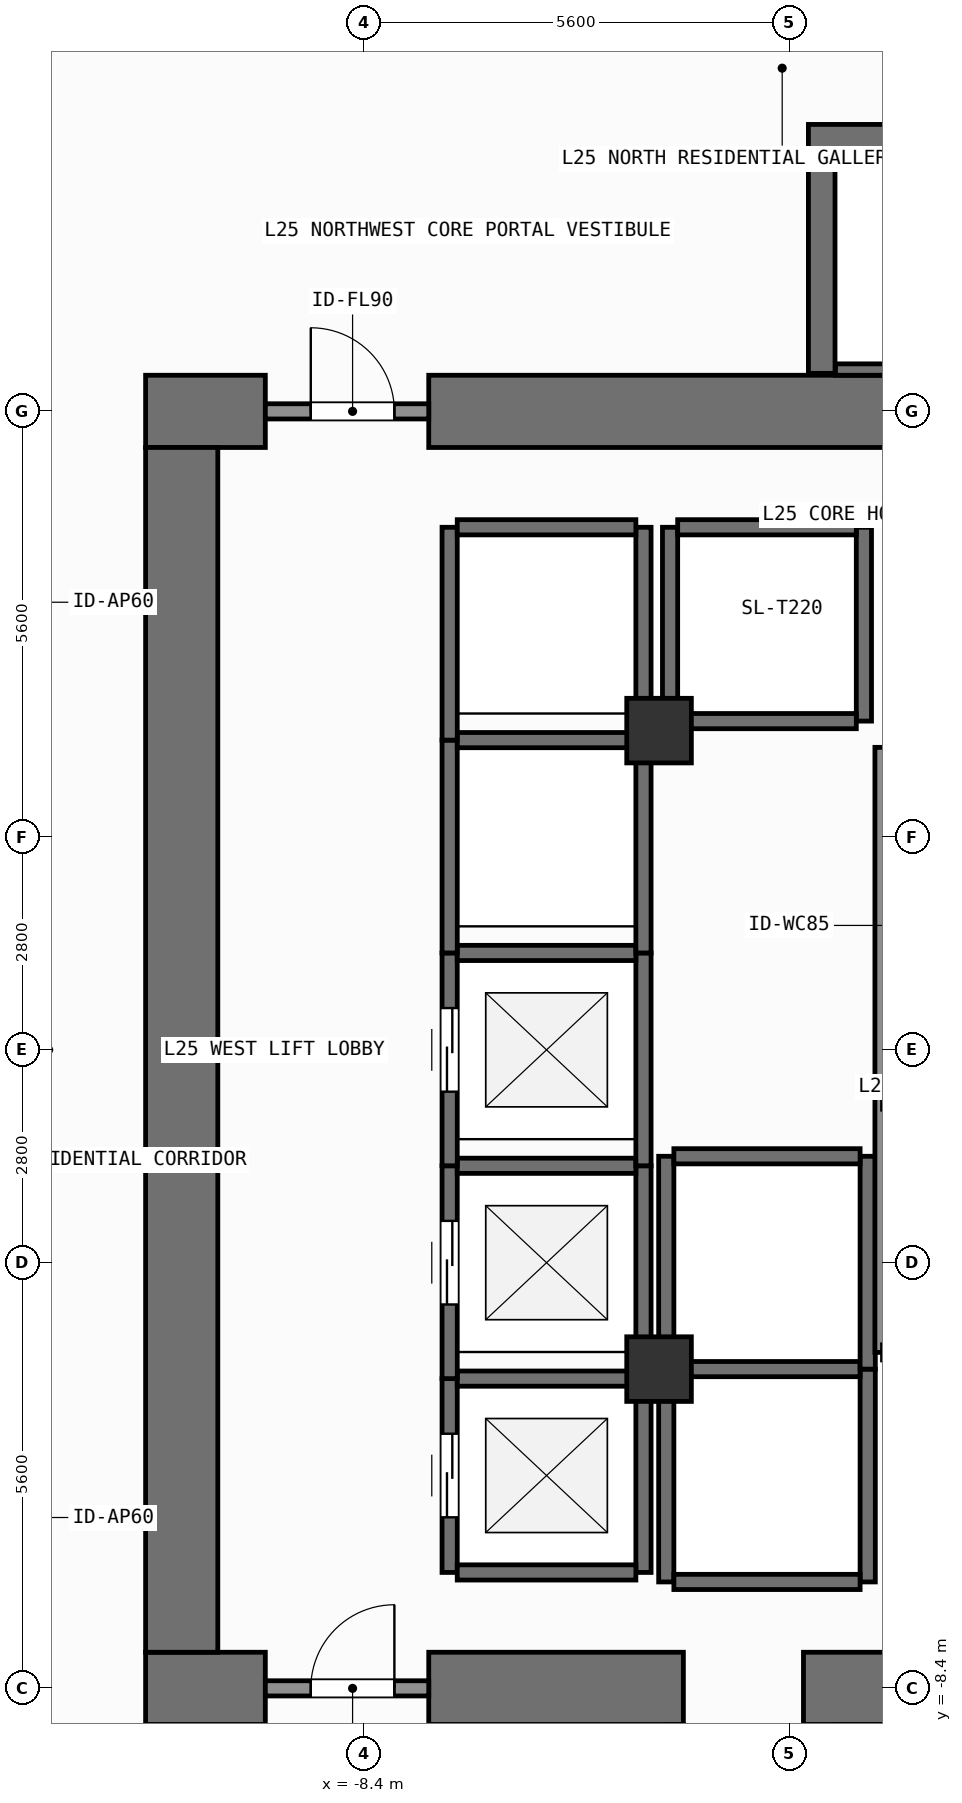
"""IFC4 building model, lengths in metres.
Left out: names, types, materials, properties, quantities, classifications, styles, units other than length and angle.
Written with IfcOpenShell. Run it as: python <this file> out.ifc"""

import sys

from ifc_helpers import new_model, si_unit, direction, frame, frame_2d, origin, origin_2d, place, context, subcontext, project, spatial, rectangle, extrude, element, fill, save


model = new_model("IFC4")
c1 = context("Model", 3, precision=1e-05, world=origin(), true_north=direction((0.0, 1.0)))
c2 = subcontext(c1, "Body", "Model", "MODEL_VIEW")
j1 = project(units=[si_unit("LENGTHUNIT", "METRE"), si_unit("PLANEANGLEUNIT", "RADIAN")], contexts=[c1])
p1 = place(None, origin())
s1 = spatial("IfcSite", under=j1, at=p1, CompositionType="ELEMENT")
p2 = place(p1, origin())
s2 = spatial("IfcBuilding", under=s1, at=p2, CompositionType="ELEMENT")
p3 = place(p2, frame((0.0, 0.0, 100.8)))
s3 = spatial("IfcBuildingStorey", under=s2, at=p3, CompositionType="ELEMENT", Elevation=100.8)
p4 = place(p3, frame((-11.275, -8.4, 0.0), z_axis=(0.0, 0.0, 1.0), x_axis=(1.0, 0.0, 0.0)))
e1 = element("IfcWall", 1, at=p4, inside=s3, PredefinedType="SHEAR", context=c2, shape_type="SweptSolid", body=[
    extrude(rectangle(XDim=1.575, YDim=0.95, at=frame_2d((0.788, 0.0))), origin(), (0.0, 0.0, 1.0), 3.9),
])
p5 = place(p3, frame((-7.55, -8.4, 0.0), z_axis=(0.0, 0.0, 1.0), x_axis=(1.0, 0.0, 0.0)))
e2 = element("IfcWall", 2, at=p5, inside=s3, PredefinedType="SHEAR", context=c2, shape_type="SweptSolid", body=[
    extrude(rectangle(XDim=3.35, YDim=0.95, at=frame_2d((1.675, 0.0))), origin(), (0.0, 0.0, 1.0), 3.9),
])
p6 = place(p3, frame((-2.62, -8.4, 0.0), z_axis=(0.0, 0.0, 1.0), x_axis=(1.0, 0.0, 0.0)))
e3 = element("IfcWall", 3, at=p6, inside=s3, PredefinedType="SHEAR", context=c2, shape_type="SweptSolid", body=[
    extrude(rectangle(XDim=7.27, YDim=0.95, at=frame_2d((3.635, 0.0))), origin(), (0.0, 0.0, 1.0), 3.9),
])
p7 = place(p3, frame((-11.275, 8.4, 0.0), z_axis=(0.0, 0.0, 1.0), x_axis=(1.0, 0.0, 0.0)))
e4 = element("IfcWall", 4, at=p7, inside=s3, PredefinedType="SHEAR", context=c2, shape_type="SweptSolid", body=[
    extrude(rectangle(XDim=1.575, YDim=0.95, at=frame_2d((0.788, 0.0))), origin(), (0.0, 0.0, 1.0), 3.9),
])
p8 = place(p3, frame((-7.55, 8.4, 0.0), z_axis=(0.0, 0.0, 1.0), x_axis=(1.0, 0.0, 0.0)))
e5 = element("IfcWall", 5, at=p8, inside=s3, PredefinedType="SHEAR", context=c2, shape_type="SweptSolid", body=[
    extrude(rectangle(XDim=16.425, YDim=0.95, at=frame_2d((8.212, 0.0))), origin(), (0.0, 0.0, 1.0), 3.9),
])
p9 = place(p3, frame((-10.8, -7.925, 0.0), z_axis=(0.0, 0.0, 1.0), x_axis=(0.0, 1.0, 0.0)))
e6 = element("IfcWall", 6, at=p9, inside=s3, PredefinedType="SHEAR", context=c2, shape_type="SweptSolid", body=[
    extrude(rectangle(XDim=15.85, YDim=0.95, at=frame_2d((7.925, 0.0))), origin(), (0.0, 0.0, 1.0), 3.9),
])
p10 = place(p3, frame((-2.555, 12.0, 0.0), z_axis=(0.0, 0.0, 1.0), x_axis=(1.0, 0.0, 0.0)))
e7 = element("IfcWall", 7, at=p10, inside=s3, PredefinedType="SHEAR", context=c2, shape_type="SweptSolid", body=[
    extrude(rectangle(XDim=7.31, YDim=0.35, at=frame_2d((3.655, 0.0))), origin(), (0.0, 0.0, 1.0), 3.9),
])
p11 = place(p3, frame((-2.2, 8.95, 0.0), z_axis=(0.0, 0.0, 1.0), x_axis=(1.0, 0.0, 0.0)))
e8 = element("IfcWall", 8, at=p11, inside=s3, PredefinedType="SHEAR", context=c2, shape_type="SweptSolid", body=[
    extrude(rectangle(XDim=6.6, YDim=0.15, at=frame_2d((3.3, 0.0))), origin(), (0.0, 0.0, 1.0), 3.9),
])
p12 = place(p3, frame((-2.38, 8.9, 0.0), z_axis=(0.0, 0.0, 1.0), x_axis=(0.0, 1.0, 0.0)))
e9 = element("IfcWall", 9, at=p12, inside=s3, PredefinedType="SHEAR", context=c2, shape_type="SweptSolid", body=[
    extrude(rectangle(XDim=2.925, YDim=0.35, at=frame_2d((1.462, 0.0))), origin(), (0.0, 0.0, 1.0), 3.9),
])
for number, where, z_axis, x_axis in (
    (10, (-4.52, -4.2, 0.0), (0.0, 0.0, 1.0), (1.0, 0.0, 0.0)),
    (11, (-4.52, 4.2, 0.0), (0.0, 0.0, 1.0), (1.0, 0.0, 0.0)),
):
    element("IfcColumn", number, at=place(p3, frame(where, z_axis=z_axis, x_axis=x_axis)), inside=s3, PredefinedType="COLUMN", context=c2, shape_type="SweptSolid", body=[
        extrude(rectangle(XDim=0.85, YDim=0.85, at=origin_2d()), origin(), (0.0, 0.0, 1.0), 3.9),
    ])
p13 = place(p3, frame((-7.275, -6.875, 0.0), z_axis=(0.0, 0.0, 1.0), x_axis=(0.0, 1.0, 0.0)))
e12 = element("IfcWall", 12, at=p13, inside=s3, PredefinedType="SHEAR", context=c2, shape_type="SweptSolid", body=[
    extrude(rectangle(XDim=2.55, YDim=0.2, at=frame_2d((1.275, 0.0))), origin(), (0.0, 0.0, 1.0), 3.68),
])
p14 = place(p13, frame((0.725, 0.0, 0.0)))
e13 = element("IfcOpeningElement", 13, at=p14, cuts=e12, PredefinedType="OPENING", context=c2, shape_type="SweptSolid", body=[
    extrude(rectangle(XDim=1.1, YDim=2.2, at=frame_2d((0.55, 1.1))), frame((0.0, 0.11, 0.0), z_axis=(0.0, -1.0, 0.0), x_axis=(1.0, 0.0, 0.0)), (0.0, 0.0, 1.0), 0.22),
])
p15 = place(p3, frame((-4.725, -6.875, 0.0), z_axis=(0.0, 0.0, 1.0), x_axis=(0.0, 1.0, 0.0)))
e14 = element("IfcWall", 14, at=p15, inside=s3, PredefinedType="SHEAR", context=c2, shape_type="SweptSolid", body=[
    extrude(rectangle(XDim=2.55, YDim=0.2, at=frame_2d((1.275, 0.0))), origin(), (0.0, 0.0, 1.0), 3.68),
])
for number, where, z_axis, x_axis in (
    (15, (-7.175, -6.875, 0.0), (0.0, 0.0, 1.0), (1.0, 0.0, 0.0)),
    (16, (-7.175, -4.325, 0.0), (0.0, 0.0, 1.0), (1.0, 0.0, 0.0)),
):
    element("IfcWall", number, at=place(p3, frame(where, z_axis=z_axis, x_axis=x_axis)), inside=s3, PredefinedType="SHEAR", context=c2, shape_type="SweptSolid", body=[
        extrude(rectangle(XDim=2.35, YDim=0.2, at=frame_2d((1.175, 0.0))), origin(), (0.0, 0.0, 1.0), 3.68),
    ])
p16 = place(p3, frame((-7.275, -4.325, 0.0), z_axis=(0.0, 0.0, 1.0), x_axis=(0.0, 1.0, 0.0)))
e17 = element("IfcWall", 17, at=p16, inside=s3, PredefinedType="SHEAR", context=c2, shape_type="SweptSolid", body=[
    extrude(rectangle(XDim=2.8, YDim=0.2, at=frame_2d((1.4, 0.0))), origin(), (0.0, 0.0, 1.0), 3.68),
])
p17 = place(p16, frame((0.975, 0.0, 0.0)))
e18 = element("IfcOpeningElement", 18, at=p17, cuts=e17, PredefinedType="OPENING", context=c2, shape_type="SweptSolid", body=[
    extrude(rectangle(XDim=1.1, YDim=2.2, at=frame_2d((0.55, 1.1))), frame((0.0, 0.11, 0.0), z_axis=(0.0, -1.0, 0.0), x_axis=(1.0, 0.0, 0.0)), (0.0, 0.0, 1.0), 0.22),
])
p18 = place(p3, frame((-4.725, -4.325, 0.0), z_axis=(0.0, 0.0, 1.0), x_axis=(0.0, 1.0, 0.0)))
e19 = element("IfcWall", 19, at=p18, inside=s3, PredefinedType="SHEAR", context=c2, shape_type="SweptSolid", body=[
    extrude(rectangle(XDim=2.8, YDim=0.2, at=frame_2d((1.4, 0.0))), origin(), (0.0, 0.0, 1.0), 3.68),
])
p19 = place(p3, frame((-7.175, -1.525, 0.0), z_axis=(0.0, 0.0, 1.0), x_axis=(1.0, 0.0, 0.0)))
e20 = element("IfcWall", 20, at=p19, inside=s3, PredefinedType="SHEAR", context=c2, shape_type="SweptSolid", body=[
    extrude(rectangle(XDim=2.35, YDim=0.2, at=frame_2d((1.175, 0.0))), origin(), (0.0, 0.0, 1.0), 3.68),
])
p20 = place(p3, frame((-7.275, -1.525, 0.0), z_axis=(0.0, 0.0, 1.0), x_axis=(0.0, 1.0, 0.0)))
e21 = element("IfcWall", 21, at=p20, inside=s3, PredefinedType="SHEAR", context=c2, shape_type="SweptSolid", body=[
    extrude(rectangle(XDim=2.8, YDim=0.2, at=frame_2d((1.4, 0.0))), origin(), (0.0, 0.0, 1.0), 3.68),
])
p21 = place(p20, frame((0.975, 0.0, 0.0)))
e22 = element("IfcOpeningElement", 22, at=p21, cuts=e21, PredefinedType="OPENING", context=c2, shape_type="SweptSolid", body=[
    extrude(rectangle(XDim=1.1, YDim=2.2, at=frame_2d((0.55, 1.1))), frame((0.0, 0.11, 0.0), z_axis=(0.0, -1.0, 0.0), x_axis=(1.0, 0.0, 0.0)), (0.0, 0.0, 1.0), 0.22),
])
p22 = place(p3, frame((-4.725, -1.525, 0.0), z_axis=(0.0, 0.0, 1.0), x_axis=(0.0, 1.0, 0.0)))
e23 = element("IfcWall", 23, at=p22, inside=s3, PredefinedType="SHEAR", context=c2, shape_type="SweptSolid", body=[
    extrude(rectangle(XDim=2.8, YDim=0.2, at=frame_2d((1.4, 0.0))), origin(), (0.0, 0.0, 1.0), 3.68),
])
p23 = place(p3, frame((-7.175, 1.275, 0.0), z_axis=(0.0, 0.0, 1.0), x_axis=(1.0, 0.0, 0.0)))
e24 = element("IfcWall", 24, at=p23, inside=s3, PredefinedType="SHEAR", context=c2, shape_type="SweptSolid", body=[
    extrude(rectangle(XDim=2.35, YDim=0.2, at=frame_2d((1.175, 0.0))), origin(), (0.0, 0.0, 1.0), 3.68),
])
for number, where, z_axis, x_axis in (
    (25, (-7.275, 1.275, 0.0), (0.0, 0.0, 1.0), (0.0, 1.0, 0.0)),
    (26, (-4.725, 1.275, 0.0), (0.0, 0.0, 1.0), (0.0, 1.0, 0.0)),
):
    element("IfcWall", number, at=place(p3, frame(where, z_axis=z_axis, x_axis=x_axis)), inside=s3, PredefinedType="SHEAR", context=c2, shape_type="SweptSolid", body=[
        extrude(rectangle(XDim=2.8, YDim=0.2, at=frame_2d((1.4, 0.0))), origin(), (0.0, 0.0, 1.0), 3.68),
    ])
p24 = place(p3, frame((-7.175, 4.075, 0.0), z_axis=(0.0, 0.0, 1.0), x_axis=(1.0, 0.0, 0.0)))
e27 = element("IfcWall", 27, at=p24, inside=s3, PredefinedType="SHEAR", context=c2, shape_type="SweptSolid", body=[
    extrude(rectangle(XDim=2.35, YDim=0.2, at=frame_2d((1.175, 0.0))), origin(), (0.0, 0.0, 1.0), 3.68),
])
for number, where, z_axis, x_axis in (
    (28, (-7.275, 4.075, 0.0), (0.0, 0.0, 1.0), (0.0, 1.0, 0.0)),
    (29, (-4.725, 4.075, 0.0), (0.0, 0.0, 1.0), (0.0, 1.0, 0.0)),
):
    element("IfcWall", number, at=place(p3, frame(where, z_axis=z_axis, x_axis=x_axis)), inside=s3, PredefinedType="SHEAR", context=c2, shape_type="SweptSolid", body=[
        extrude(rectangle(XDim=2.8, YDim=0.2, at=frame_2d((1.4, 0.0))), origin(), (0.0, 0.0, 1.0), 3.68),
    ])
p25 = place(p3, frame((-7.175, 6.875, 0.0), z_axis=(0.0, 0.0, 1.0), x_axis=(1.0, 0.0, 0.0)))
e30 = element("IfcWall", 30, at=p25, inside=s3, PredefinedType="SHEAR", context=c2, shape_type="SweptSolid", body=[
    extrude(rectangle(XDim=2.35, YDim=0.2, at=frame_2d((1.175, 0.0))), origin(), (0.0, 0.0, 1.0), 3.68),
])
for number, where, z_axis, x_axis in (
    (31, (-4.375, 4.325, 0.0), (0.0, 0.0, 1.0), (0.0, 1.0, 0.0)),
    (32, (-1.825, 4.325, 0.0), (0.0, 0.0, 1.0), (0.0, 1.0, 0.0)),
):
    element("IfcWall", number, at=place(p3, frame(where, z_axis=z_axis, x_axis=x_axis)), inside=s3, PredefinedType="SHEAR", context=c2, shape_type="SweptSolid", body=[
        extrude(rectangle(XDim=2.55, YDim=0.2, at=frame_2d((1.275, 0.0))), origin(), (0.0, 0.0, 1.0), 3.68),
    ])
for number, where, z_axis, x_axis in (
    (33, (-4.275, 4.325, 0.0), (0.0, 0.0, 1.0), (1.0, 0.0, 0.0)),
    (34, (-4.275, 6.875, 0.0), (0.0, 0.0, 1.0), (1.0, 0.0, 0.0)),
):
    element("IfcWall", number, at=place(p3, frame(where, z_axis=z_axis, x_axis=x_axis)), inside=s3, PredefinedType="SHEAR", context=c2, shape_type="SweptSolid", body=[
        extrude(rectangle(XDim=2.35, YDim=0.2, at=frame_2d((1.175, 0.0))), origin(), (0.0, 0.0, 1.0), 3.68),
    ])
for number, where, z_axis, x_axis in (
    (35, (-4.425, -7.0, 0.0), (0.0, 0.0, 1.0), (0.0, 1.0, 0.0)),
    (36, (-1.775, -7.0, 0.0), (0.0, 0.0, 1.0), (0.0, 1.0, 0.0)),
):
    element("IfcWall", number, at=place(p3, frame(where, z_axis=z_axis, x_axis=x_axis)), inside=s3, PredefinedType="SHEAR", context=c2, shape_type="SweptSolid", body=[
        extrude(rectangle(XDim=2.8, YDim=0.2, at=frame_2d((1.4, 0.0))), origin(), (0.0, 0.0, 1.0), 3.68),
    ])
for number, where, z_axis, x_axis in (
    (37, (-4.325, -7.0, 0.0), (0.0, 0.0, 1.0), (1.0, 0.0, 0.0)),
    (38, (-4.325, -4.2, 0.0), (0.0, 0.0, 1.0), (1.0, 0.0, 0.0)),
):
    element("IfcWall", number, at=place(p3, frame(where, z_axis=z_axis, x_axis=x_axis)), inside=s3, PredefinedType="SHEAR", context=c2, shape_type="SweptSolid", body=[
        extrude(rectangle(XDim=2.45, YDim=0.2, at=frame_2d((1.225, 0.0))), origin(), (0.0, 0.0, 1.0), 3.68),
    ])
for number, where, z_axis, x_axis in (
    (39, (-4.425, -4.2, 0.0), (0.0, 0.0, 1.0), (0.0, 1.0, 0.0)),
    (40, (-1.775, -4.2, 0.0), (0.0, 0.0, 1.0), (0.0, 1.0, 0.0)),
):
    element("IfcWall", number, at=place(p3, frame(where, z_axis=z_axis, x_axis=x_axis)), inside=s3, PredefinedType="SHEAR", context=c2, shape_type="SweptSolid", body=[
        extrude(rectangle(XDim=2.8, YDim=0.2, at=frame_2d((1.4, 0.0))), origin(), (0.0, 0.0, 1.0), 3.68),
    ])
p26 = place(p3, frame((-4.325, -1.4, 0.0), z_axis=(0.0, 0.0, 1.0), x_axis=(1.0, 0.0, 0.0)))
e41 = element("IfcWall", 41, at=p26, inside=s3, PredefinedType="SHEAR", context=c2, shape_type="SweptSolid", body=[
    extrude(rectangle(XDim=2.45, YDim=0.2, at=frame_2d((1.225, 0.0))), origin(), (0.0, 0.0, 1.0), 3.68),
])
p27 = place(p3, frame((-9.7, -8.4, 0.0), z_axis=(0.0, 0.0, 1.0), x_axis=(1.0, 0.0, 0.0)))
e42 = element("IfcWall", 42, at=p27, inside=s3, PredefinedType="SOLIDWALL", context=c2, shape_type="SweptSolid", body=[
    extrude(rectangle(XDim=2.15, YDim=0.2, at=frame_2d((1.075, 0.0))), origin(), (0.0, 0.0, 1.0), 2.72),
])
p28 = place(p27, frame((0.598, 0.0, 0.0)))
e43 = element("IfcOpeningElement", 43, at=p28, cuts=e42, PredefinedType="OPENING", context=c2, shape_type="SweptSolid", body=[
    extrude(rectangle(XDim=1.1, YDim=2.15, at=frame_2d((0.55, 1.075))), frame((0.0, 0.11, 0.0), z_axis=(0.0, -1.0, 0.0), x_axis=(1.0, 0.0, 0.0)), (0.0, 0.0, 1.0), 0.22),
])
p29 = place(p3, frame((-9.7, 8.4, 0.0), z_axis=(0.0, 0.0, 1.0), x_axis=(1.0, 0.0, 0.0)))
e44 = element("IfcWall", 44, at=p29, inside=s3, PredefinedType="SOLIDWALL", context=c2, shape_type="SweptSolid", body=[
    extrude(rectangle(XDim=2.15, YDim=0.2, at=frame_2d((1.075, 0.0))), origin(), (0.0, 0.0, 1.0), 2.72),
])
p30 = place(p29, frame((0.598, 0.0, 0.0)))
e45 = element("IfcOpeningElement", 45, at=p30, cuts=e44, PredefinedType="OPENING", context=c2, shape_type="SweptSolid", body=[
    extrude(rectangle(XDim=1.1, YDim=2.15, at=frame_2d((0.55, 1.075))), frame((0.0, 0.11, 0.0), z_axis=(0.0, -1.0, 0.0), x_axis=(1.0, 0.0, 0.0)), (0.0, 0.0, 1.0), 0.22),
])
p31 = place(p3, frame((-1.58, -3.98, 0.0), z_axis=(0.0, 0.0, 1.0), x_axis=(0.0, 1.0, 0.0)))
e46 = element("IfcWall", 46, at=p31, inside=s3, PredefinedType="SOLIDWALL", context=c2, shape_type="SweptSolid", body=[
    extrude(rectangle(XDim=7.96, YDim=0.2, at=frame_2d((3.98, 0.0))), origin(), (0.0, 0.0, 1.0), 3.68),
])
p32 = place(p14, origin())
e47 = element("IfcDoor", 47, at=p32, inside=s3, OperationType="SLIDING_TO_LEFT", PredefinedType="DOOR", context=c2, shape_type="SweptSolid", body=[
    extrude(rectangle(XDim=1.1, YDim=2.2, at=frame_2d((0.55, 1.1))), frame((0.0, 0.025, 0.0), z_axis=(0.0, -1.0, 0.0), x_axis=(1.0, 0.0, 0.0)), (0.0, 0.0, 1.0), 0.05),
])
fill(e13, e47)
p33 = place(p17, origin())
e48 = element("IfcDoor", 48, at=p33, inside=s3, OperationType="SLIDING_TO_LEFT", PredefinedType="DOOR", context=c2, shape_type="SweptSolid", body=[
    extrude(rectangle(XDim=1.1, YDim=2.2, at=frame_2d((0.55, 1.1))), frame((0.0, 0.025, 0.0), z_axis=(0.0, -1.0, 0.0), x_axis=(1.0, 0.0, 0.0)), (0.0, 0.0, 1.0), 0.05),
])
fill(e18, e48)
p34 = place(p21, origin())
e49 = element("IfcDoor", 49, at=p34, inside=s3, OperationType="SLIDING_TO_LEFT", PredefinedType="DOOR", context=c2, shape_type="SweptSolid", body=[
    extrude(rectangle(XDim=1.1, YDim=2.2, at=frame_2d((0.55, 1.1))), frame((0.0, 0.025, 0.0), z_axis=(0.0, -1.0, 0.0), x_axis=(1.0, 0.0, 0.0)), (0.0, 0.0, 1.0), 0.05),
])
fill(e22, e49)
p35 = place(p28, origin())
e50 = element("IfcDoor", 50, at=p35, inside=s3, OperationType="SINGLE_SWING_RIGHT", PredefinedType="DOOR", context=c2, shape_type="SweptSolid", body=[
    extrude(rectangle(XDim=1.1, YDim=2.15, at=frame_2d((0.55, 1.075))), frame((0.0, 0.025, 0.0), z_axis=(0.0, -1.0, 0.0), x_axis=(1.0, 0.0, 0.0)), (0.0, 0.0, 1.0), 0.05),
])
fill(e43, e50)
p36 = place(p30, origin())
e51 = element("IfcDoor", 51, at=p36, inside=s3, OperationType="SINGLE_SWING_LEFT", PredefinedType="DOOR", context=c2, shape_type="SweptSolid", body=[
    extrude(rectangle(XDim=1.1, YDim=2.15, at=frame_2d((0.55, 1.075))), frame((0.0, 0.025, 0.0), z_axis=(0.0, -1.0, 0.0), x_axis=(1.0, 0.0, 0.0)), (0.0, 0.0, 1.0), 0.05),
])
fill(e45, e51)
save(model, sys.argv[1])
